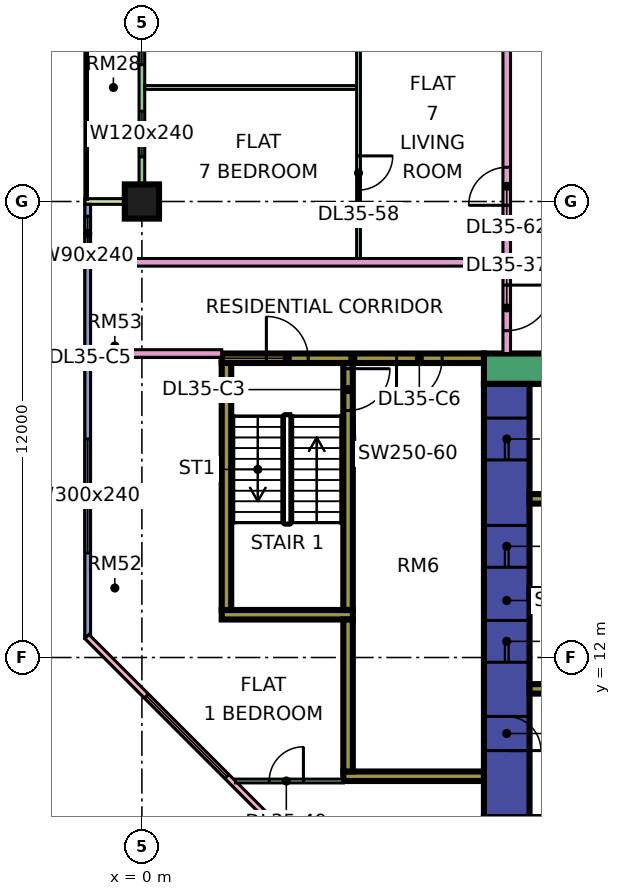
"""IFC4 building model, lengths in metres.
Left out: names, types, materials, properties, quantities, classifications, styles, units other than length and angle.
Written with IfcOpenShell. Run it as: python <this file> out.ifc"""

import sys

from ifc_helpers import new_model, si_unit, direction, frame, frame_2d, origin, origin_2d, place, context, subcontext, project, spatial, rectangle, extrude, element, fill, save


model = new_model("IFC4")
c1 = context("Model", 3, precision=1e-05, world=origin(), true_north=direction((0.0, 1.0)))
c2 = subcontext(c1, "Body", "Model", "MODEL_VIEW")
j1 = project(units=[si_unit("LENGTHUNIT", "METRE"), si_unit("PLANEANGLEUNIT", "RADIAN")], contexts=[c1])
p1 = place(None, origin())
s1 = spatial("IfcSite", under=j1, at=p1, CompositionType="ELEMENT")
p2 = place(p1, origin())
s2 = spatial("IfcBuilding", under=s1, at=p2, CompositionType="ELEMENT")
p3 = place(p2, frame((0.0, 0.0, 157.4)))
s3 = spatial("IfcBuildingStorey", under=s2, at=p3, CompositionType="ELEMENT", Elevation=157.4)
p4 = place(p3, frame((0.0, 24.0, 0.0), z_axis=(0.0, 0.0, 1.0), x_axis=(1.0, 0.0, 0.0)))
e1 = element("IfcColumn", 1, at=p4, inside=s3, PredefinedType="COLUMN", context=c2, shape_type="SweptSolid", body=[
    extrude(rectangle(XDim=0.9, YDim=0.9, at=origin_2d()), origin(), (0.0, 0.0, 1.0), 3.75),
])
p5 = place(p3, frame((9.0, 19.6, 0.0), z_axis=(0.0, 0.0, 1.0), x_axis=(1.0, 0.0, 0.0)))
e2 = element("IfcWall", 2, at=p5, inside=s3, PredefinedType="SHEAR", context=c2, shape_type="SweptSolid", body=[
    extrude(rectangle(XDim=25.0, YDim=0.8, at=frame_2d((12.5, 0.0))), origin(), (0.0, 0.0, 1.0), 3.75),
])
p6 = place(p5, frame((19.1, 0.0, 0.0)))
e3 = element("IfcOpeningElement", 3, at=p6, cuts=e2, PredefinedType="OPENING", context=c2, shape_type="SweptSolid", body=[
    extrude(rectangle(XDim=1.8, YDim=2.4, at=frame_2d((0.9, 1.2))), frame((0.0, 0.41, 0.0), z_axis=(0.0, -1.0, 0.0), x_axis=(1.0, 0.0, 0.0)), (0.0, 0.0, 1.0), 0.82),
])
p7 = place(p3, frame((9.6, 7.8, 0.0), z_axis=(0.0, 0.0, 1.0), x_axis=(0.0, 1.0, 0.0)))
e4 = element("IfcWall", 4, at=p7, inside=s3, PredefinedType="SHEAR", context=c2, shape_type="SweptSolid", body=[
    extrude(rectangle(XDim=11.4, YDim=1.2, at=frame_2d((5.7, 0.0))), origin(), (0.0, 0.0, 1.0), 3.75),
])
p8 = place(p7, frame((4.075, 0.0, 0.0)))
e5 = element("IfcOpeningElement", 5, at=p8, cuts=e4, PredefinedType="OPENING", context=c2, shape_type="SweptSolid", body=[
    extrude(rectangle(XDim=1.1, YDim=2.2, at=frame_2d((0.55, 1.1))), frame((0.0, 0.61, 0.0), z_axis=(0.0, -1.0, 0.0), x_axis=(1.0, 0.0, 0.0)), (0.0, 0.0, 1.0), 1.22),
])
p9 = place(p7, frame((6.575, 0.0, 0.0)))
e6 = element("IfcOpeningElement", 6, at=p9, cuts=e4, PredefinedType="OPENING", context=c2, shape_type="SweptSolid", body=[
    extrude(rectangle(XDim=1.1, YDim=2.2, at=frame_2d((0.55, 1.1))), frame((0.0, 0.61, 0.0), z_axis=(0.0, -1.0, 0.0), x_axis=(1.0, 0.0, 0.0)), (0.0, 0.0, 1.0), 1.22),
])
p10 = place(p7, frame((9.4, 0.0, 0.0)))
e7 = element("IfcOpeningElement", 7, at=p10, cuts=e4, PredefinedType="OPENING", context=c2, shape_type="SweptSolid", body=[
    extrude(rectangle(XDim=1.1, YDim=2.2, at=frame_2d((0.55, 1.1))), frame((0.0, 0.61, 0.0), z_axis=(0.0, -1.0, 0.0), x_axis=(1.0, 0.0, 0.0)), (0.0, 0.0, 1.0), 1.22),
])
p11 = place(p7, frame((1.75, 0.0, 0.0)))
e8 = element("IfcOpeningElement", 8, at=p11, cuts=e4, PredefinedType="OPENING", context=c2, shape_type="SweptSolid", body=[
    extrude(rectangle(XDim=0.9, YDim=2.1, at=frame_2d((0.45, 1.05))), frame((0.0, 0.61, 0.0), z_axis=(0.0, -1.0, 0.0), x_axis=(1.0, 0.0, 0.0)), (0.0, 0.0, 1.0), 1.22),
])
for number, where, z_axis, x_axis in (
    (9, (10.2, 11.175, 0.0), (0.0, 0.0, 1.0), (1.0, 0.0, 0.0)),
    (10, (10.2, 13.675, 0.0), (0.0, 0.0, 1.0), (1.0, 0.0, 0.0)),
    (11, (10.2, 16.175, 0.0), (0.0, 0.0, 1.0), (1.0, 0.0, 0.0)),
):
    element("IfcWall", number, at=place(p3, frame(where, z_axis=z_axis, x_axis=x_axis)), inside=s3, PredefinedType="SHEAR", context=c2, shape_type="SweptSolid", body=[
        extrude(rectangle(XDim=3.0, YDim=0.25, at=frame_2d((1.5, 0.0))), origin(), (0.0, 0.0, 1.0), 3.75),
    ])
p12 = place(p3, frame((2.1, 19.875, 0.0), z_axis=(0.0, 0.0, 1.0), x_axis=(1.0, 0.0, 0.0)))
e12 = element("IfcWall", 12, at=p12, inside=s3, PredefinedType="SHEAR", context=c2, shape_type="SweptSolid", body=[
    extrude(rectangle(XDim=6.9, YDim=0.25, at=frame_2d((3.45, 0.0))), origin(), (0.0, 0.0, 1.0), 3.75),
])
p13 = place(p12, frame((1.175, 0.0, 0.0)))
e13 = element("IfcOpeningElement", 13, at=p13, cuts=e12, PredefinedType="OPENING", context=c2, shape_type="SweptSolid", body=[
    extrude(rectangle(XDim=1.1, YDim=2.2, at=frame_2d((0.55, 1.1))), frame((0.0, 0.135, 0.0), z_axis=(0.0, -1.0, 0.0), x_axis=(1.0, 0.0, 0.0)), (0.0, 0.0, 1.0), 0.27),
])
p14 = place(p12, frame((4.6, 0.0, 0.0)))
e14 = element("IfcOpeningElement", 14, at=p14, cuts=e12, PredefinedType="OPENING", context=c2, shape_type="SweptSolid", body=[
    extrude(rectangle(XDim=1.2, YDim=2.2, at=frame_2d((0.6, 1.1))), frame((0.0, 0.135, 0.0), z_axis=(0.0, -1.0, 0.0), x_axis=(1.0, 0.0, 0.0)), (0.0, 0.0, 1.0), 0.27),
])
p15 = place(p3, frame((2.1, 13.125, 0.0), z_axis=(0.0, 0.0, 1.0), x_axis=(1.0, 0.0, 0.0)))
e15 = element("IfcWall", 15, at=p15, inside=s3, PredefinedType="SHEAR", context=c2, shape_type="SweptSolid", body=[
    extrude(rectangle(XDim=3.45, YDim=0.25, at=frame_2d((1.725, 0.0))), origin(), (0.0, 0.0, 1.0), 3.75),
])
p16 = place(p3, frame((2.225, 13.25, 0.0), z_axis=(0.0, 0.0, 1.0), x_axis=(0.0, 1.0, 0.0)))
e16 = element("IfcWall", 16, at=p16, inside=s3, PredefinedType="SHEAR", context=c2, shape_type="SweptSolid", body=[
    extrude(rectangle(XDim=6.5, YDim=0.25, at=frame_2d((3.25, 0.0))), origin(), (0.0, 0.0, 1.0), 3.75),
])
p17 = place(p3, frame((5.425, 13.25, 0.0), z_axis=(0.0, 0.0, 1.0), x_axis=(0.0, 1.0, 0.0)))
e17 = element("IfcWall", 17, at=p17, inside=s3, PredefinedType="SHEAR", context=c2, shape_type="SweptSolid", body=[
    extrude(rectangle(XDim=6.5, YDim=0.25, at=frame_2d((3.25, 0.0))), origin(), (0.0, 0.0, 1.0), 3.75),
])
p18 = place(p17, frame((5.25, 0.0, 0.0)))
e18 = element("IfcOpeningElement", 18, at=p18, cuts=e17, PredefinedType="OPENING", context=c2, shape_type="SweptSolid", body=[
    extrude(rectangle(XDim=1.1, YDim=2.2, at=frame_2d((0.55, 1.1))), frame((0.0, 0.135, 0.0), z_axis=(0.0, -1.0, 0.0), x_axis=(1.0, 0.0, 0.0)), (0.0, 0.0, 1.0), 0.27),
])
p19 = place(p3, frame((5.3, 8.875, 0.0), z_axis=(0.0, 0.0, 1.0), x_axis=(1.0, 0.0, 0.0)))
e19 = element("IfcWall", 19, at=p19, inside=s3, PredefinedType="SHEAR", context=c2, shape_type="SweptSolid", body=[
    extrude(rectangle(XDim=3.7, YDim=0.25, at=frame_2d((1.85, 0.0))), origin(), (0.0, 0.0, 1.0), 3.75),
])
p20 = place(p3, frame((5.425, 9.0, 0.0), z_axis=(0.0, 0.0, 1.0), x_axis=(0.0, 1.0, 0.0)))
e20 = element("IfcWall", 20, at=p20, inside=s3, PredefinedType="SHEAR", context=c2, shape_type="SweptSolid", body=[
    extrude(rectangle(XDim=4.0, YDim=0.25, at=frame_2d((2.0, 0.0))), origin(), (0.0, 0.0, 1.0), 3.75),
])
p21 = place(p3, frame((0.0, 35.925, 0.0), z_axis=(0.0, 0.0, 1.0), x_axis=(0.0, -1.0, 0.0)))
e21 = element("IfcWall", 21, at=p21, inside=s3, PredefinedType="SOLIDWALL", context=c2, shape_type="SweptSolid", body=[
    extrude(rectangle(XDim=11.85, YDim=0.15, at=frame_2d((5.925, 0.0))), origin(), (0.0, 0.0, 1.0), 3.35),
])
p22 = place(p21, frame((1.1, 0.0, 0.0)))
e22 = element("IfcOpeningElement", 22, at=p22, cuts=e21, PredefinedType="OPENING", context=c2, shape_type="SweptSolid", body=[
    extrude(rectangle(XDim=1.2, YDim=2.4, at=frame_2d((0.6, 1.2))), frame((0.0, 0.085, 0.0), z_axis=(0.0, -1.0, 0.0), x_axis=(1.0, 0.0, 0.0)), (0.0, 0.0, 1.0), 0.17),
])
p23 = place(p21, frame((3.525, 0.0, 0.45)))
e23 = element("IfcOpeningElement", 23, at=p23, cuts=e21, PredefinedType="OPENING", context=c2, shape_type="SweptSolid", body=[
    extrude(rectangle(XDim=1.8, YDim=2.4, at=frame_2d((0.9, 1.2))), frame((0.0, 0.085, 0.0), z_axis=(0.0, -1.0, 0.0), x_axis=(1.0, 0.0, 0.0)), (0.0, 0.0, 1.0), 0.17),
])
p24 = place(p21, frame((6.525, 0.0, 0.45)))
e24 = element("IfcOpeningElement", 24, at=p24, cuts=e21, PredefinedType="OPENING", context=c2, shape_type="SweptSolid", body=[
    extrude(rectangle(XDim=1.8, YDim=2.4, at=frame_2d((0.9, 1.2))), frame((0.0, 0.085, 0.0), z_axis=(0.0, -1.0, 0.0), x_axis=(1.0, 0.0, 0.0)), (0.0, 0.0, 1.0), 0.17),
])
p25 = place(p21, frame((9.55, 0.0, 0.45)))
e25 = element("IfcOpeningElement", 25, at=p25, cuts=e21, PredefinedType="OPENING", context=c2, shape_type="SweptSolid", body=[
    extrude(rectangle(XDim=1.2, YDim=2.4, at=frame_2d((0.6, 1.2))), frame((0.0, 0.085, 0.0), z_axis=(0.0, -1.0, 0.0), x_axis=(1.0, 0.0, 0.0)), (0.0, 0.0, 1.0), 0.17),
])
p26 = place(p3, frame((-1.5, 24.0, 0.0), z_axis=(0.0, 0.0, 1.0), x_axis=(1.0, 0.0, 0.0)))
e26 = element("IfcWall", 26, at=p26, inside=s3, PredefinedType="SOLIDWALL", context=c2, shape_type="SweptSolid", body=[
    extrude(rectangle(XDim=1.5, YDim=0.15, at=frame_2d((0.75, 0.0))), origin(), (0.0, 0.0, 1.0), 3.35),
])
p27 = place(p3, frame((-1.425, 23.925, 0.0), z_axis=(0.0, 0.0, 1.0), x_axis=(0.0, -1.0, 0.0)))
e27 = element("IfcWall", 27, at=p27, inside=s3, PredefinedType="SOLIDWALL", context=c2, shape_type="SweptSolid", body=[
    extrude(rectangle(XDim=11.425, YDim=0.15, at=frame_2d((5.712, 0.0))), origin(), (0.0, 0.0, 1.0), 3.35),
])
p28 = place(p27, frame((0.312, 0.0, 0.45)))
e28 = element("IfcOpeningElement", 28, at=p28, cuts=e27, PredefinedType="OPENING", context=c2, shape_type="SweptSolid", body=[
    extrude(rectangle(XDim=0.9, YDim=2.4, at=frame_2d((0.45, 1.2))), frame((0.0, 0.085, 0.0), z_axis=(0.0, -1.0, 0.0), x_axis=(1.0, 0.0, 0.0)), (0.0, 0.0, 1.0), 0.17),
])
p29 = place(p27, frame((6.175, 0.0, 0.45)))
e29 = element("IfcOpeningElement", 29, at=p29, cuts=e27, PredefinedType="OPENING", context=c2, shape_type="SweptSolid", body=[
    extrude(rectangle(XDim=3.0, YDim=2.4, at=frame_2d((1.5, 1.2))), frame((0.0, 0.085, 0.0), z_axis=(0.0, -1.0, 0.0), x_axis=(1.0, 0.0, 0.0)), (0.0, 0.0, 1.0), 0.17),
])
p30 = place(p3, frame((-1.447, 12.553, 0.0), z_axis=(0.0, 0.0, 1.0), x_axis=(0.707106781187, -0.707106781187, 0.0)))
e30 = element("IfcWall", 30, at=p30, inside=s3, PredefinedType="SOLIDWALL", context=c2, shape_type="SweptSolid", body=[
    extrude(rectangle(XDim=19.799, YDim=0.15, at=frame_2d((9.899, 0.0))), origin(), (0.0, 0.0, 1.0), 3.35),
])
p31 = place(p30, frame((2.212, 0.0, 0.45)))
e31 = element("IfcOpeningElement", 31, at=p31, cuts=e30, PredefinedType="OPENING", context=c2, shape_type="SweptSolid", body=[
    extrude(rectangle(XDim=3.0, YDim=2.4, at=frame_2d((1.5, 1.2))), frame((0.0, 0.085, 0.0), z_axis=(0.0, -1.0, 0.0), x_axis=(1.0, 0.0, 0.0)), (0.0, 0.0, 1.0), 0.17),
])
p32 = place(p30, frame((10.216, 0.0, 0.45)))
e32 = element("IfcOpeningElement", 32, at=p32, cuts=e30, PredefinedType="OPENING", context=c2, shape_type="SweptSolid", body=[
    extrude(rectangle(XDim=3.0, YDim=2.4, at=frame_2d((1.5, 1.2))), frame((0.0, 0.085, 0.0), z_axis=(0.0, -1.0, 0.0), x_axis=(1.0, 0.0, 0.0)), (0.0, 0.0, 1.0), 0.17),
])
p33 = place(p3, frame((-1.35, 20.0, 0.0), z_axis=(0.0, 0.0, 1.0), x_axis=(1.0, 0.0, 0.0)))
e33 = element("IfcWall", 33, at=p33, inside=s3, PredefinedType="PARTITIONING", context=c2, shape_type="SweptSolid", body=[
    extrude(rectangle(XDim=3.45, YDim=0.2, at=frame_2d((1.725, 0.0))), origin(), (0.0, 0.0, 1.0), 3.35),
])
p34 = place(p3, frame((-1.35, 22.4, 0.0), z_axis=(0.0, 0.0, 1.0), x_axis=(1.0, 0.0, 0.0)))
e34 = element("IfcWall", 34, at=p34, inside=s3, PredefinedType="PARTITIONING", context=c2, shape_type="SweptSolid", body=[
    extrude(rectangle(XDim=10.85, YDim=0.2, at=frame_2d((5.425, 0.0))), origin(), (0.0, 0.0, 1.0), 3.35),
])
p35 = place(p3, frame((0.074, 27.0, 0.0), z_axis=(0.0, 0.0, 1.0), x_axis=(1.0, 0.0, 0.0)))
e35 = element("IfcWall", 35, at=p35, inside=s3, PredefinedType="PARTITIONING", context=c2, shape_type="SweptSolid", body=[
    extrude(rectangle(XDim=5.576, YDim=0.1, at=frame_2d((2.788, 0.0))), origin(), (0.0, 0.0, 1.0), 3.35),
])
p36 = place(p3, frame((2.461, 8.75, 0.0), z_axis=(0.0, 0.0, 1.0), x_axis=(1.0, 0.0, 0.0)))
e36 = element("IfcWall", 36, at=p36, inside=s3, PredefinedType="PARTITIONING", context=c2, shape_type="SweptSolid", body=[
    extrude(rectangle(XDim=2.839, YDim=0.1, at=frame_2d((1.419, 0.0))), origin(), (0.0, 0.0, 1.0), 3.35),
])
p37 = place(p36, frame((0.889, 0.0, 0.0)))
e37 = element("IfcOpeningElement", 37, at=p37, cuts=e36, PredefinedType="OPENING", context=c2, shape_type="SweptSolid", body=[
    extrude(rectangle(XDim=0.9, YDim=2.1, at=frame_2d((0.45, 1.05))), frame((0.0, 0.06, 0.0), z_axis=(0.0, -1.0, 0.0), x_axis=(1.0, 0.0, 0.0)), (0.0, 0.0, 1.0), 0.12),
])
p38 = place(p3, frame((5.7, 22.5, 0.0), z_axis=(0.0, 0.0, 1.0), x_axis=(0.0, 1.0, 0.0)))
e38 = element("IfcWall", 38, at=p38, inside=s3, PredefinedType="PARTITIONING", context=c2, shape_type="SweptSolid", body=[
    extrude(rectangle(XDim=10.55, YDim=0.1, at=frame_2d((5.275, 0.0))), origin(), (0.0, 0.0, 1.0), 3.35),
])
p39 = place(p38, frame((1.8, 0.0, 0.0)))
e39 = element("IfcOpeningElement", 39, at=p39, cuts=e38, PredefinedType="OPENING", context=c2, shape_type="SweptSolid", body=[
    extrude(rectangle(XDim=0.9, YDim=2.1, at=frame_2d((0.45, 1.05))), frame((0.0, 0.06, 0.0), z_axis=(0.0, -1.0, 0.0), x_axis=(1.0, 0.0, 0.0)), (0.0, 0.0, 1.0), 0.12),
])
p40 = place(p38, frame((5.55, 0.0, 0.0)))
e40 = element("IfcOpeningElement", 40, at=p40, cuts=e38, PredefinedType="OPENING", context=c2, shape_type="SweptSolid", body=[
    extrude(rectangle(XDim=0.9, YDim=2.1, at=frame_2d((0.45, 1.05))), frame((0.0, 0.06, 0.0), z_axis=(0.0, -1.0, 0.0), x_axis=(1.0, 0.0, 0.0)), (0.0, 0.0, 1.0), 0.12),
])
p41 = place(p38, frame((8.55, 0.0, 0.0)))
e41 = element("IfcOpeningElement", 41, at=p41, cuts=e38, PredefinedType="OPENING", context=c2, shape_type="SweptSolid", body=[
    extrude(rectangle(XDim=0.9, YDim=2.1, at=frame_2d((0.45, 1.05))), frame((0.0, 0.06, 0.0), z_axis=(0.0, -1.0, 0.0), x_axis=(1.0, 0.0, 0.0)), (0.0, 0.0, 1.0), 0.12),
])
p42 = place(p3, frame((9.6, 20.0, 0.0), z_axis=(0.0, 0.0, 1.0), x_axis=(0.0, 1.0, 0.0)))
e42 = element("IfcWall", 42, at=p42, inside=s3, PredefinedType="PARTITIONING", context=c2, shape_type="SweptSolid", body=[
    extrude(rectangle(XDim=42.926, YDim=0.2, at=frame_2d((21.463, 0.0))), origin(), (0.0, 0.0, 1.0), 3.35),
])
p43 = place(p42, frame((40.8, 0.0, 0.0)))
e43 = element("IfcOpeningElement", 43, at=p43, cuts=e42, PredefinedType="OPENING", context=c2, shape_type="SweptSolid", body=[
    extrude(rectangle(XDim=1.0, YDim=2.1, at=frame_2d((0.5, 1.05))), frame((0.0, 0.11, 0.0), z_axis=(0.0, -1.0, 0.0), x_axis=(1.0, 0.0, 0.0)), (0.0, 0.0, 1.0), 0.22),
])
p44 = place(p42, frame((0.6, 0.0, 0.0)))
e44 = element("IfcOpeningElement", 44, at=p44, cuts=e42, PredefinedType="OPENING", context=c2, shape_type="SweptSolid", body=[
    extrude(rectangle(XDim=1.2, YDim=2.1, at=frame_2d((0.6, 1.05))), frame((0.0, 0.11, 0.0), z_axis=(0.0, -1.0, 0.0), x_axis=(1.0, 0.0, 0.0)), (0.0, 0.0, 1.0), 0.22),
])
p45 = place(p42, frame((3.9, 0.0, 0.0)))
e45 = element("IfcOpeningElement", 45, at=p45, cuts=e42, PredefinedType="OPENING", context=c2, shape_type="SweptSolid", body=[
    extrude(rectangle(XDim=1.0, YDim=2.1, at=frame_2d((0.5, 1.05))), frame((0.0, 0.11, 0.0), z_axis=(0.0, -1.0, 0.0), x_axis=(1.0, 0.0, 0.0)), (0.0, 0.0, 1.0), 0.22),
])
p46 = place(p24, origin())
e46 = element("IfcWindow", 46, at=p46, inside=s3, PartitioningType="SINGLE_PANEL", PredefinedType="WINDOW", context=c2, shape_type="SweptSolid", body=[
    extrude(rectangle(XDim=1.8, YDim=2.4, at=frame_2d((0.9, 1.2))), frame((0.0, 0.03, 0.0), z_axis=(0.0, -1.0, 0.0), x_axis=(1.0, 0.0, 0.0)), (0.0, 0.0, 1.0), 0.06),
])
fill(e24, e46)
p47 = place(p25, origin())
e47 = element("IfcWindow", 47, at=p47, inside=s3, PartitioningType="SINGLE_PANEL", PredefinedType="WINDOW", context=c2, shape_type="SweptSolid", body=[
    extrude(rectangle(XDim=1.2, YDim=2.4, at=frame_2d((0.6, 1.2))), frame((0.0, 0.03, 0.0), z_axis=(0.0, -1.0, 0.0), x_axis=(1.0, 0.0, 0.0)), (0.0, 0.0, 1.0), 0.06),
])
fill(e25, e47)
p48 = place(p28, origin())
e48 = element("IfcWindow", 48, at=p48, inside=s3, PartitioningType="SINGLE_PANEL", PredefinedType="WINDOW", context=c2, shape_type="SweptSolid", body=[
    extrude(rectangle(XDim=0.9, YDim=2.4, at=frame_2d((0.45, 1.2))), frame((0.0, 0.03, 0.0), z_axis=(0.0, -1.0, 0.0), x_axis=(1.0, 0.0, 0.0)), (0.0, 0.0, 1.0), 0.06),
])
fill(e28, e48)
p49 = place(p29, origin())
e49 = element("IfcWindow", 49, at=p49, inside=s3, PartitioningType="SINGLE_PANEL", PredefinedType="WINDOW", context=c2, shape_type="SweptSolid", body=[
    extrude(rectangle(XDim=3.0, YDim=2.4, at=frame_2d((1.5, 1.2))), frame((0.0, 0.03, 0.0), z_axis=(0.0, -1.0, 0.0), x_axis=(1.0, 0.0, 0.0)), (0.0, 0.0, 1.0), 0.06),
])
fill(e29, e49)
p50 = place(p31, origin())
e50 = element("IfcWindow", 50, at=p50, inside=s3, PartitioningType="SINGLE_PANEL", PredefinedType="WINDOW", context=c2, shape_type="SweptSolid", body=[
    extrude(rectangle(XDim=3.0, YDim=2.4, at=frame_2d((1.5, 1.2))), frame((0.0, 0.03, 0.0), z_axis=(0.0, -1.0, 0.0), x_axis=(1.0, 0.0, 0.0)), (0.0, 0.0, 1.0), 0.06),
])
fill(e31, e50)
p51 = place(p8, origin())
e51 = element("IfcDoor", 51, at=p51, inside=s3, OperationType="DOUBLE_DOOR_SLIDING", PredefinedType="DOOR", context=c2, shape_type="SweptSolid", body=[
    extrude(rectangle(XDim=1.1, YDim=2.2, at=frame_2d((0.55, 1.1))), frame((0.0, 0.025, 0.0), z_axis=(0.0, -1.0, 0.0), x_axis=(1.0, 0.0, 0.0)), (0.0, 0.0, 1.0), 0.05),
])
fill(e5, e51)
p52 = place(p9, origin())
e52 = element("IfcDoor", 52, at=p52, inside=s3, OperationType="DOUBLE_DOOR_SLIDING", PredefinedType="DOOR", context=c2, shape_type="SweptSolid", body=[
    extrude(rectangle(XDim=1.1, YDim=2.2, at=frame_2d((0.55, 1.1))), frame((0.0, 0.025, 0.0), z_axis=(0.0, -1.0, 0.0), x_axis=(1.0, 0.0, 0.0)), (0.0, 0.0, 1.0), 0.05),
])
fill(e6, e52)
p53 = place(p10, origin())
e53 = element("IfcDoor", 53, at=p53, inside=s3, OperationType="DOUBLE_DOOR_SLIDING", PredefinedType="DOOR", context=c2, shape_type="SweptSolid", body=[
    extrude(rectangle(XDim=1.1, YDim=2.2, at=frame_2d((0.55, 1.1))), frame((0.0, 0.025, 0.0), z_axis=(0.0, -1.0, 0.0), x_axis=(1.0, 0.0, 0.0)), (0.0, 0.0, 1.0), 0.05),
])
fill(e7, e53)
p54 = place(p18, origin())
e54 = element("IfcDoor", 54, at=p54, inside=s3, OperationType="SINGLE_SWING_RIGHT", PredefinedType="DOOR", context=c2, shape_type="SweptSolid", body=[
    extrude(rectangle(XDim=1.1, YDim=2.2, at=frame_2d((0.55, 1.1))), frame((0.0, 0.025, 0.0), z_axis=(0.0, -1.0, 0.0), x_axis=(1.0, 0.0, 0.0)), (0.0, 0.0, 1.0), 0.05),
])
fill(e18, e54)
p55 = place(p11, frame((0.9, 0.0, 0.0), z_axis=(0.0, 0.0, 1.0), x_axis=(-1.0, 0.0, 0.0)))
e55 = element("IfcDoor", 55, at=p55, inside=s3, OperationType="SINGLE_SWING_LEFT", PredefinedType="DOOR", context=c2, shape_type="SweptSolid", body=[
    extrude(rectangle(XDim=0.9, YDim=2.1, at=frame_2d((0.45, 1.05))), frame((0.0, 0.025, 0.0), z_axis=(0.0, -1.0, 0.0), x_axis=(1.0, 0.0, 0.0)), (0.0, 0.0, 1.0), 0.05),
])
fill(e8, e55)
p56 = place(p13, origin())
e56 = element("IfcDoor", 56, at=p56, inside=s3, OperationType="SINGLE_SWING_LEFT", PredefinedType="DOOR", context=c2, shape_type="SweptSolid", body=[
    extrude(rectangle(XDim=1.1, YDim=2.2, at=frame_2d((0.55, 1.1))), frame((0.0, 0.025, 0.0), z_axis=(0.0, -1.0, 0.0), x_axis=(1.0, 0.0, 0.0)), (0.0, 0.0, 1.0), 0.05),
])
fill(e13, e56)
p57 = place(p14, frame((1.2, 0.0, 0.0), z_axis=(0.0, 0.0, 1.0), x_axis=(-1.0, 0.0, 0.0)))
e57 = element("IfcDoor", 57, at=p57, inside=s3, OperationType="SINGLE_SWING_LEFT", PredefinedType="DOOR", context=c2, shape_type="SweptSolid", body=[
    extrude(rectangle(XDim=1.2, YDim=2.2, at=frame_2d((0.6, 1.1))), frame((0.0, 0.025, 0.0), z_axis=(0.0, -1.0, 0.0), x_axis=(1.0, 0.0, 0.0)), (0.0, 0.0, 1.0), 0.05),
])
fill(e14, e57)
p58 = place(p44, origin())
e58 = element("IfcDoor", 58, at=p58, inside=s3, OperationType="SINGLE_SWING_RIGHT", PredefinedType="DOOR", context=c2, shape_type="SweptSolid", body=[
    extrude(rectangle(XDim=1.2, YDim=2.1, at=frame_2d((0.6, 1.05))), frame((0.0, 0.025, 0.0), z_axis=(0.0, -1.0, 0.0), x_axis=(1.0, 0.0, 0.0)), (0.0, 0.0, 1.0), 0.05),
])
fill(e44, e58)
p59 = place(p37, frame((0.9, 0.0, 0.0), z_axis=(0.0, 0.0, 1.0), x_axis=(-1.0, 0.0, 0.0)))
e59 = element("IfcDoor", 59, at=p59, inside=s3, OperationType="SINGLE_SWING_RIGHT", PredefinedType="DOOR", context=c2, shape_type="SweptSolid", body=[
    extrude(rectangle(XDim=0.9, YDim=2.1, at=frame_2d((0.45, 1.05))), frame((0.0, 0.025, 0.0), z_axis=(0.0, -1.0, 0.0), x_axis=(1.0, 0.0, 0.0)), (0.0, 0.0, 1.0), 0.05),
])
fill(e37, e59)
p60 = place(p39, origin())
e60 = element("IfcDoor", 60, at=p60, inside=s3, OperationType="SINGLE_SWING_RIGHT", PredefinedType="DOOR", context=c2, shape_type="SweptSolid", body=[
    extrude(rectangle(XDim=0.9, YDim=2.1, at=frame_2d((0.45, 1.05))), frame((0.0, 0.025, 0.0), z_axis=(0.0, -1.0, 0.0), x_axis=(1.0, 0.0, 0.0)), (0.0, 0.0, 1.0), 0.05),
])
fill(e39, e60)
p61 = place(p45, origin())
e61 = element("IfcDoor", 61, at=p61, inside=s3, OperationType="SINGLE_SWING_LEFT", PredefinedType="DOOR", context=c2, shape_type="SweptSolid", body=[
    extrude(rectangle(XDim=1.0, YDim=2.1, at=frame_2d((0.5, 1.05))), frame((0.0, 0.025, 0.0), z_axis=(0.0, -1.0, 0.0), x_axis=(1.0, 0.0, 0.0)), (0.0, 0.0, 1.0), 0.05),
])
fill(e45, e61)
save(model, sys.argv[1])
